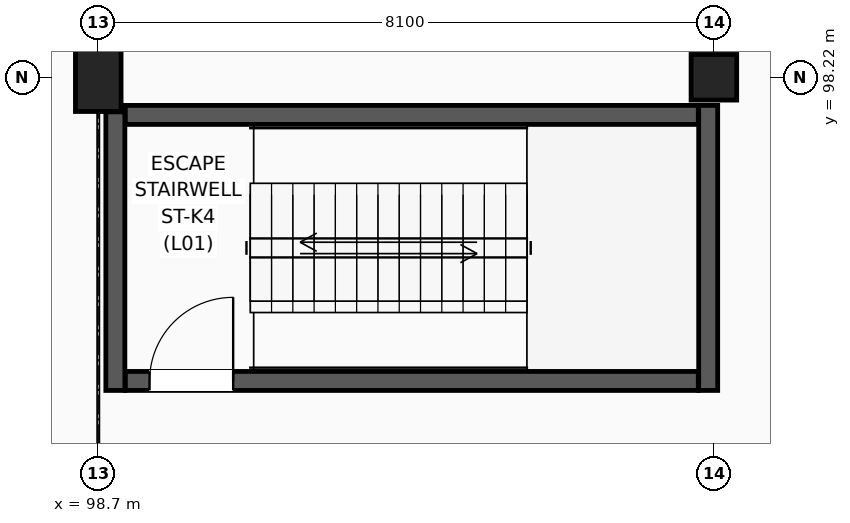
"""IFC4 building model, lengths in metres.
Left out: names, types, materials, properties, quantities, classifications, styles, units other than length and angle.
Written with IfcOpenShell. Run it as: python <this file> out.ifc"""

import sys

from ifc_helpers import new_model, si_unit, direction, frame, frame_2d, origin, origin_2d, place, context, subcontext, project, spatial, rectangle, extrude, element, fill, save


model = new_model("IFC4")
c1 = context("Model", 3, precision=1e-05, world=origin(), true_north=direction((0.0, 1.0)))
c2 = subcontext(c1, "Body", "Model", "MODEL_VIEW")
j1 = project(units=[si_unit("LENGTHUNIT", "METRE"), si_unit("PLANEANGLEUNIT", "RADIAN")], contexts=[c1])
p1 = place(None, origin())
s1 = spatial("IfcSite", under=j1, at=p1, CompositionType="ELEMENT")
p2 = place(p1, origin())
s2 = spatial("IfcBuilding", under=s1, at=p2, CompositionType="ELEMENT")
p3 = place(p2, frame((0.0, 0.0, 5.4)))
s3 = spatial("IfcBuildingStorey", under=s2, at=p3, CompositionType="ELEMENT", Elevation=5.4)
p4 = place(p3, frame((98.7, 98.22, 0.0), z_axis=(0.0, 0.0, 1.0), x_axis=(1.0, 0.0, 0.0)))
e1 = element("IfcColumn", 1, at=p4, inside=s3, PredefinedType="COLUMN", context=c2, shape_type="SweptSolid", body=[
    extrude(rectangle(XDim=0.6, YDim=0.9, at=origin_2d()), origin(), (0.0, 0.0, 1.0), 4.8),
])
p5 = place(p3, frame((106.8, 98.22, 0.0), z_axis=(0.0, 0.0, 1.0), x_axis=(1.0, 0.0, 0.0)))
e2 = element("IfcColumn", 2, at=p5, inside=s3, PredefinedType="COLUMN", context=c2, shape_type="SweptSolid", body=[
    extrude(rectangle(XDim=0.6, YDim=0.6, at=origin_2d()), origin(), (0.0, 0.0, 1.0), 4.8),
])
p6 = place(p3, frame((99.055, 94.225, 0.0), z_axis=(0.0, 0.0, 1.0), x_axis=(1.0, 0.0, 0.0)))
e3 = element("IfcWall", 3, at=p6, inside=s3, PredefinedType="SHEAR", context=c2, shape_type="SweptSolid", body=[
    extrude(rectangle(XDim=7.54, YDim=0.25, at=frame_2d((3.77, 0.0))), origin(), (0.0, 0.0, 1.0), 4.525),
])
p7 = place(p6, frame((0.32, 0.0, 0.0)))
e4 = element("IfcOpeningElement", 4, at=p7, cuts=e3, PredefinedType="OPENING", context=c2, shape_type="SweptSolid", body=[
    extrude(rectangle(XDim=1.1, YDim=2.2, at=frame_2d((0.55, 1.1))), frame((0.0, 0.135, 0.0), z_axis=(0.0, -1.0, 0.0), x_axis=(1.0, 0.0, 0.0)), (0.0, 0.0, 1.0), 0.27),
])
p8 = place(p3, frame((99.055, 97.725, 0.0), z_axis=(0.0, 0.0, 1.0), x_axis=(1.0, 0.0, 0.0)))
e5 = element("IfcWall", 5, at=p8, inside=s3, PredefinedType="SHEAR", context=c2, shape_type="SweptSolid", body=[
    extrude(rectangle(XDim=7.54, YDim=0.25, at=frame_2d((3.77, 0.0))), origin(), (0.0, 0.0, 1.0), 4.525),
])
p9 = place(p3, frame((98.925, 94.1, 0.0), z_axis=(0.0, 0.0, 1.0), x_axis=(0.0, 1.0, 0.0)))
e6 = element("IfcWall", 6, at=p9, inside=s3, PredefinedType="SHEAR", context=c2, shape_type="SweptSolid", body=[
    extrude(rectangle(XDim=3.665, YDim=0.25, at=frame_2d((1.833, 0.0))), origin(), (0.0, 0.0, 1.0), 4.525),
])
p10 = place(p3, frame((106.725, 94.1, 0.0), z_axis=(0.0, 0.0, 1.0), x_axis=(0.0, 1.0, 0.0)))
e7 = element("IfcWall", 7, at=p10, inside=s3, PredefinedType="SHEAR", context=c2, shape_type="SweptSolid", body=[
    extrude(rectangle(XDim=3.75, YDim=0.25, at=frame_2d((1.875, 0.0))), origin(), (0.0, 0.0, 1.0), 4.525),
])
p11 = place(p7, origin())
e8 = element("IfcDoor", 8, at=p11, inside=s3, OperationType="SINGLE_SWING_RIGHT", PredefinedType="DOOR", context=c2, shape_type="SweptSolid", body=[
    extrude(rectangle(XDim=1.1, YDim=2.2, at=frame_2d((0.55, 1.1))), frame((0.0, 0.025, 0.0), z_axis=(0.0, -1.0, 0.0), x_axis=(1.0, 0.0, 0.0)), (0.0, 0.0, 1.0), 0.05),
])
fill(e4, e8)
save(model, sys.argv[1])
